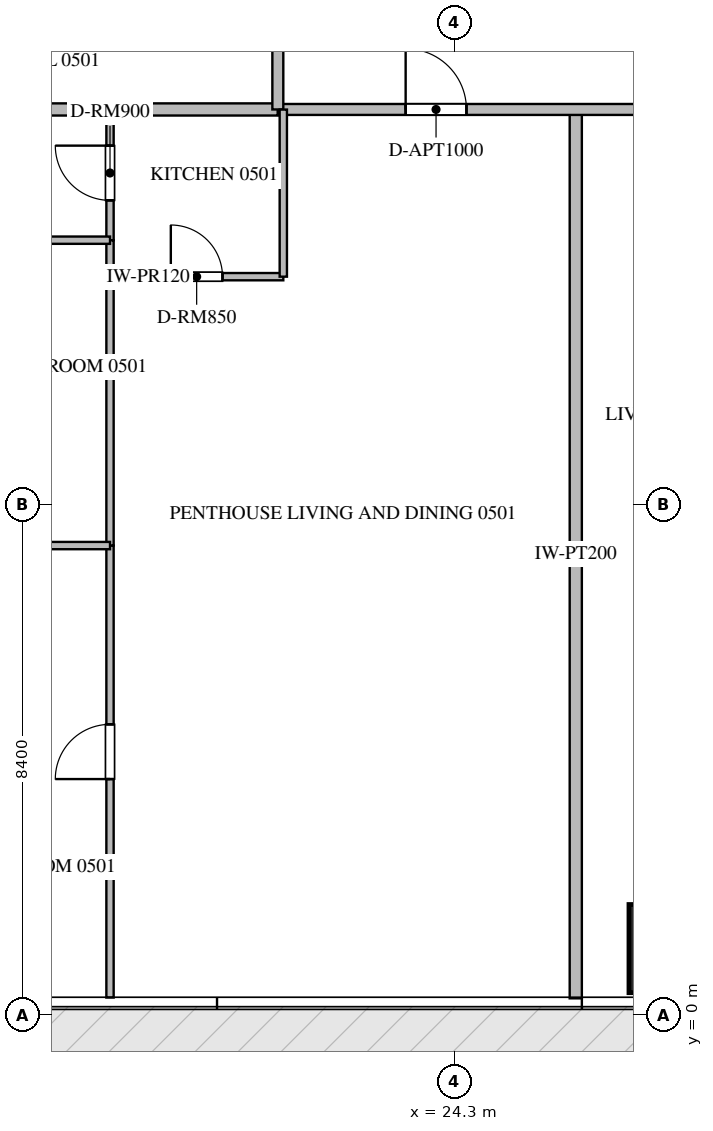
"""IFC4 building model, lengths in metres.
Left out: names, types, materials, properties, quantities, classifications, styles, units other than length and angle.
Written with IfcOpenShell. Run it as: python <this file> out.ifc"""

import sys

from ifc_helpers import new_model, si_unit, direction, frame, frame_2d, origin, origin_2d, place, context, subcontext, project, spatial, rectangle, extrude, source, transform, mapped, element, fill, save


model = new_model("IFC4")
c1 = context("Model", 3, precision=1e-05, world=origin(), true_north=direction((0.0, 1.0)))
c2 = subcontext(c1, "Body", "Model", "MODEL_VIEW")
j1 = project(units=[si_unit("LENGTHUNIT", "METRE"), si_unit("PLANEANGLEUNIT", "RADIAN")], contexts=[c1])
p1 = place(None, origin())
s1 = spatial("IfcSite", under=j1, at=p1, CompositionType="ELEMENT")
p2 = place(p1, origin())
s2 = spatial("IfcBuilding", under=s1, at=p2, CompositionType="ELEMENT")
p3 = place(p2, frame((0.0, 0.0, 26.7)))
s3 = spatial("IfcBuildingStorey", under=s2, at=p3, CompositionType="ELEMENT", Elevation=26.7)
m1 = source(origin(), c2, "Body", "SweptSolid", [
    extrude(rectangle(XDim=1.45, YDim=1.45, at=origin_2d()), origin(), (0.0, 0.0, 1.0), 3.93),
])
p4 = place(p3, frame((27.9, 1.1, -0.44), z_axis=(0.0, 0.0, 1.0), x_axis=(1.0, 0.0, 0.0)))
e1 = element("IfcColumn", 1, at=p4, inside=s3, PredefinedType="COLUMN", context=c2, shape_type="MappedRepresentation", body=[
    mapped(m1, transform((0.0, 0.0, 0.0), scale=1.0)),
])
p5 = place(p3, frame((26.3, 0.282, 0.0), z_axis=(0.0, 0.0, 1.0), x_axis=(0.0, 1.0, 0.0)))
e2 = element("IfcWall", 2, at=p5, inside=s3, PredefinedType="PARTITIONING", context=c2, shape_type="SweptSolid", body=[
    extrude(rectangle(XDim=14.618, YDim=0.2, at=frame_2d((7.309, 0.0))), origin(), (0.0, 0.0, 1.0), 3.49),
])
p6 = place(p3, frame((6.082, 14.9, 0.0), z_axis=(0.0, 0.0, 1.0), x_axis=(1.0, 0.0, 0.0)))
e3 = element("IfcWall", 3, at=p6, inside=s3, PredefinedType="PARTITIONING", context=c2, shape_type="SweptSolid", body=[
    extrude(rectangle(XDim=15.318, YDim=0.2, at=frame_2d((7.659, 0.0))), origin(), (0.0, 0.0, 1.0), 3.49),
])
p7 = place(p3, frame((21.402, 14.9, 0.0), z_axis=(0.0, 0.0, 1.0), x_axis=(1.0, 0.0, 0.0)))
e4 = element("IfcWall", 4, at=p7, inside=s3, PredefinedType="PARTITIONING", context=c2, shape_type="SweptSolid", body=[
    extrude(rectangle(XDim=21.996, YDim=0.18, at=frame_2d((10.998, 0.0))), origin(), (0.0, 0.0, 1.0), 3.49),
])
p8 = place(p7, frame((2.1, 0.0, 0.0)))
e5 = element("IfcOpeningElement", 5, at=p8, cuts=e4, PredefinedType="OPENING", context=c2, shape_type="SweptSolid", body=[
    extrude(rectangle(XDim=1.0, YDim=2.15, at=frame_2d((0.5, 1.075))), frame((0.0, 0.1, 0.0), z_axis=(0.0, -1.0, 0.0), x_axis=(1.0, 0.0, 0.0)), (0.0, 0.0, 1.0), 0.2),
])
p9 = place(p7, frame((6.719, 0.0, 0.0)))
e6 = element("IfcOpeningElement", 6, at=p9, cuts=e4, PredefinedType="OPENING", context=c2, shape_type="SweptSolid", body=[
    extrude(rectangle(XDim=1.0, YDim=2.15, at=frame_2d((0.5, 1.075))), frame((0.0, 0.1, 0.0), z_axis=(0.0, -1.0, 0.0), x_axis=(1.0, 0.0, 0.0)), (0.0, 0.0, 1.0), 0.2),
])
p10 = place(p7, frame((18.896, 0.0, 0.0)))
e7 = element("IfcOpeningElement", 7, at=p10, cuts=e4, PredefinedType="OPENING", context=c2, shape_type="SweptSolid", body=[
    extrude(rectangle(XDim=1.0, YDim=2.15, at=frame_2d((0.5, 1.075))), frame((0.0, 0.1, 0.0), z_axis=(0.0, -1.0, 0.0), x_axis=(1.0, 0.0, 0.0)), (0.0, 0.0, 1.0), 0.2),
])
p11 = place(p3, frame((21.4, 14.9, 0.0), z_axis=(0.0, 0.0, 1.0), x_axis=(0.0, 1.0, 0.0)))
e8 = element("IfcWall", 8, at=p11, inside=s3, PredefinedType="PARTITIONING", context=c2, shape_type="SweptSolid", body=[
    extrude(rectangle(XDim=20.6, YDim=0.18, at=frame_2d((10.3, 0.0))), origin(), (0.0, 0.0, 1.0), 3.49),
])
p12 = place(p11, frame((17.64, 0.0, 0.0)))
e9 = element("IfcOpeningElement", 9, at=p12, cuts=e8, PredefinedType="OPENING", context=c2, shape_type="SweptSolid", body=[
    extrude(rectangle(XDim=1.0, YDim=2.15, at=frame_2d((0.5, 1.075))), frame((0.0, 0.1, 0.0), z_axis=(0.0, -1.0, 0.0), x_axis=(1.0, 0.0, 0.0)), (0.0, 0.0, 1.0), 0.2),
])
p13 = place(p3, frame((18.64, 12.15, 0.0), z_axis=(0.0, 0.0, 1.0), x_axis=(1.0, 0.0, 0.0)))
e10 = element("IfcWall", 10, at=p13, inside=s3, PredefinedType="PARTITIONING", context=c2, shape_type="SweptSolid", body=[
    extrude(rectangle(XDim=2.85, YDim=0.12, at=frame_2d((1.425, 0.0))), origin(), (0.0, 0.0, 1.0), 3.49),
])
p14 = place(p13, frame((1.0, 0.0, 0.0)))
e11 = element("IfcOpeningElement", 11, at=p14, cuts=e10, PredefinedType="OPENING", context=c2, shape_type="SweptSolid", body=[
    extrude(rectangle(XDim=0.85, YDim=2.1, at=frame_2d((0.425, 1.05))), frame((0.0, 0.07, 0.0), z_axis=(0.0, -1.0, 0.0), x_axis=(1.0, 0.0, 0.0)), (0.0, 0.0, 1.0), 0.14),
])
p15 = place(p3, frame((21.49, 12.15, 0.0), z_axis=(0.0, 0.0, 1.0), x_axis=(0.0, 1.0, 0.0)))
e12 = element("IfcWall", 12, at=p15, inside=s3, PredefinedType="PARTITIONING", context=c2, shape_type="SweptSolid", body=[
    extrude(rectangle(XDim=2.748, YDim=0.12, at=frame_2d((1.374, 0.0))), origin(), (0.0, 0.0, 1.0), 3.49),
])
p16 = place(p3, frame((18.64, 12.75, 0.0), z_axis=(0.0, 0.0, 1.0), x_axis=(0.0, 1.0, 0.0)))
e13 = element("IfcWall", 13, at=p16, inside=s3, PredefinedType="PARTITIONING", context=c2, shape_type="SweptSolid", body=[
    extrude(rectangle(XDim=2.21, YDim=0.12, at=frame_2d((1.105, 0.0))), origin(), (0.0, 0.0, 1.0), 3.49),
])
p17 = place(p16, frame((0.655, 0.0, 0.0)))
e14 = element("IfcOpeningElement", 14, at=p17, cuts=e13, PredefinedType="OPENING", context=c2, shape_type="SweptSolid", body=[
    extrude(rectangle(XDim=0.9, YDim=2.1, at=frame_2d((0.45, 1.05))), frame((0.0, 0.07, 0.0), z_axis=(0.0, -1.0, 0.0), x_axis=(1.0, 0.0, 0.0)), (0.0, 0.0, 1.0), 0.14),
])
p18 = place(p3, frame((18.64, 0.295, 0.0), z_axis=(0.0, 0.0, 1.0), x_axis=(0.0, 1.0, 0.0)))
e15 = element("IfcWall", 15, at=p18, inside=s3, PredefinedType="PARTITIONING", context=c2, shape_type="SweptSolid", body=[
    extrude(rectangle(XDim=7.433, YDim=0.12, at=frame_2d((3.717, 0.0))), origin(), (0.0, 0.0, 1.0), 3.49),
])
p19 = place(p18, frame((3.593, 0.0, 0.0)))
e16 = element("IfcOpeningElement", 16, at=p19, cuts=e15, PredefinedType="OPENING", context=c2, shape_type="SweptSolid", body=[
    extrude(rectangle(XDim=0.9, YDim=2.1, at=frame_2d((0.45, 1.05))), frame((0.0, 0.07, 0.0), z_axis=(0.0, -1.0, 0.0), x_axis=(1.0, 0.0, 0.0)), (0.0, 0.0, 1.0), 0.14),
])
p20 = place(p3, frame((18.64, 7.73, 0.0), z_axis=(0.0, 0.0, 1.0), x_axis=(0.0, 1.0, 0.0)))
e17 = element("IfcWall", 17, at=p20, inside=s3, PredefinedType="PARTITIONING", context=c2, shape_type="SweptSolid", body=[
    extrude(rectangle(XDim=5.018, YDim=0.12, at=frame_2d((2.509, 0.0))), origin(), (0.0, 0.0, 1.0), 3.49),
])
p21 = place(p3, frame((13.49, 7.728, 0.0), z_axis=(0.0, 0.0, 1.0), x_axis=(1.0, 0.0, 0.0)))
e18 = element("IfcWall", 18, at=p21, inside=s3, PredefinedType="PARTITIONING", context=c2, shape_type="SweptSolid", body=[
    extrude(rectangle(XDim=5.15, YDim=0.12, at=frame_2d((2.575, 0.0))), origin(), (0.0, 0.0, 1.0), 3.49),
])
p22 = place(p3, frame((15.592, 12.75, 0.0), z_axis=(0.0, 0.0, 1.0), x_axis=(1.0, 0.0, 0.0)))
e19 = element("IfcWall", 19, at=p22, inside=s3, PredefinedType="PARTITIONING", context=c2, shape_type="SweptSolid", body=[
    extrude(rectangle(XDim=3.048, YDim=0.12, at=frame_2d((1.524, 0.0))), origin(), (0.0, 0.0, 1.0), 3.49),
])
p23 = place(p22, frame((1.099, 0.0, 0.0)))
e20 = element("IfcOpeningElement", 20, at=p23, cuts=e19, PredefinedType="OPENING", context=c2, shape_type="SweptSolid", body=[
    extrude(rectangle(XDim=0.85, YDim=2.1, at=frame_2d((0.425, 1.05))), frame((0.0, 0.07, 0.0), z_axis=(0.0, -1.0, 0.0), x_axis=(1.0, 0.0, 0.0)), (0.0, 0.0, 1.0), 0.14),
])
m2 = source(origin(), c2, "Body", "SweptSolid", [
    extrude(rectangle(XDim=1.0, YDim=2.15, at=frame_2d((0.5, 1.075))), frame((0.0, 0.025, 0.0), z_axis=(0.0, -1.0, 0.0), x_axis=(1.0, 0.0, 0.0)), (0.0, 0.0, 1.0), 0.05),
])
p24 = place(p8, origin())
e21 = element("IfcDoor", 21, at=p24, inside=s3, OperationType="SINGLE_SWING_LEFT", PredefinedType="DOOR", context=c2, shape_type="MappedRepresentation", body=[
    mapped(m2, transform((0.0, 0.0, 0.0), scale=1.0)),
])
fill(e5, e21)
m3 = source(origin(), c2, "Body", "SweptSolid", [
    extrude(rectangle(XDim=0.85, YDim=2.1, at=frame_2d((0.425, 1.05))), frame((0.0, 0.025, 0.0), z_axis=(0.0, -1.0, 0.0), x_axis=(1.0, 0.0, 0.0)), (0.0, 0.0, 1.0), 0.05),
])
p25 = place(p14, origin())
e22 = element("IfcDoor", 22, at=p25, inside=s3, OperationType="SINGLE_SWING_LEFT", PredefinedType="DOOR", context=c2, shape_type="MappedRepresentation", body=[
    mapped(m3, transform((0.0, 0.0, 0.0), scale=1.0)),
])
fill(e11, e22)
m4 = source(origin(), c2, "Body", "SweptSolid", [
    extrude(rectangle(XDim=0.9, YDim=2.1, at=frame_2d((0.45, 1.05))), frame((0.0, 0.025, 0.0), z_axis=(0.0, -1.0, 0.0), x_axis=(1.0, 0.0, 0.0)), (0.0, 0.0, 1.0), 0.05),
])
p26 = place(p17, origin())
e23 = element("IfcDoor", 23, at=p26, inside=s3, OperationType="SINGLE_SWING_RIGHT", PredefinedType="DOOR", context=c2, shape_type="MappedRepresentation", body=[
    mapped(m4, transform((0.0, 0.0, 0.0), scale=1.0)),
])
fill(e14, e23)
p27 = place(p19, origin())
e24 = element("IfcDoor", 24, at=p27, inside=s3, OperationType="SINGLE_SWING_LEFT", PredefinedType="DOOR", context=c2, shape_type="MappedRepresentation", body=[
    mapped(m4, transform((0.0, 0.0, 0.0), scale=1.0)),
])
fill(e16, e24)
save(model, sys.argv[1])
